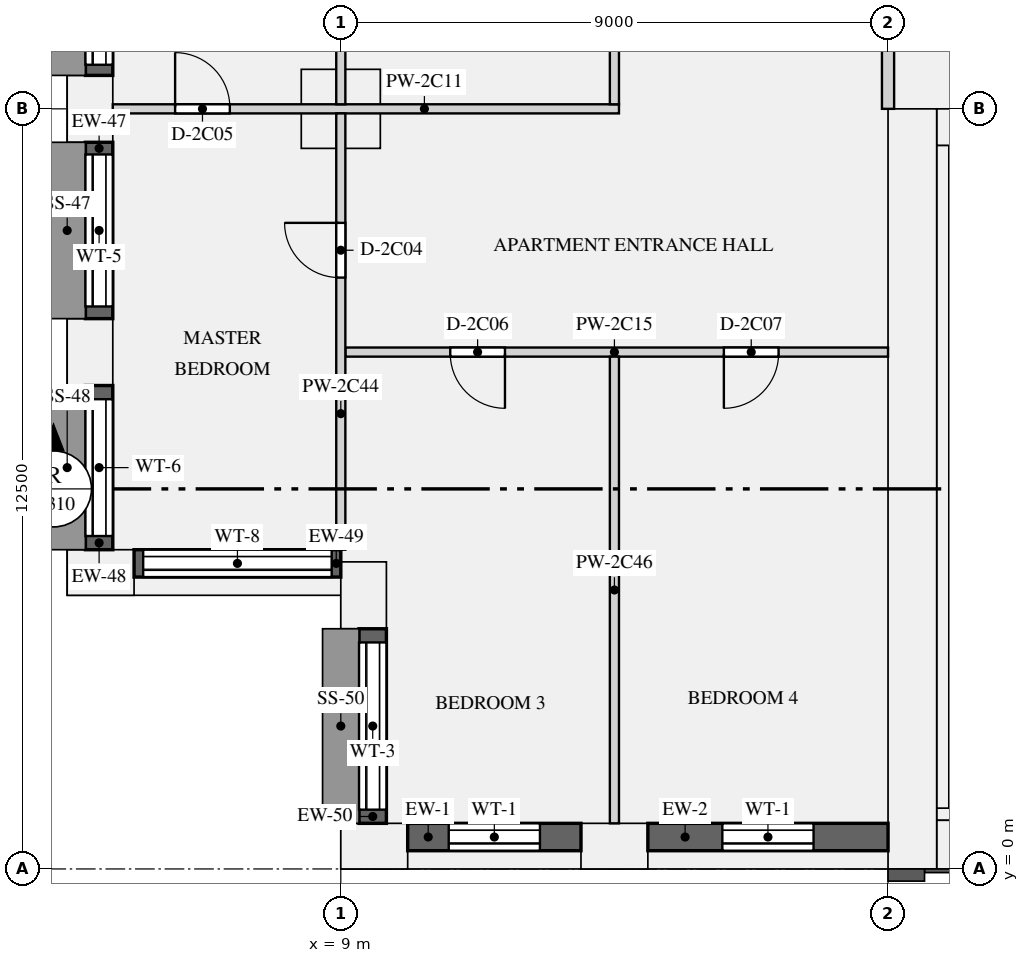
"""IFC4 building model, lengths in metres.
Left out: names, types, materials, properties, quantities, classifications, styles, units other than length and angle.
Written with IfcOpenShell. Run it as: python <this file> out.ifc"""

import sys

from ifc_helpers import new_model, si_unit, direction, frame, frame_2d, origin, origin_2d, place, context, subcontext, project, spatial, rectangle, extrude, element, fill, save


model = new_model("IFC4")
c1 = context("Model", 3, precision=1e-05, world=origin(), true_north=direction((0.0, 1.0)))
c2 = subcontext(c1, "Body", "Model", "MODEL_VIEW")
j1 = project(units=[si_unit("LENGTHUNIT", "METRE"), si_unit("PLANEANGLEUNIT", "RADIAN")], contexts=[c1])
p1 = place(None, origin())
s1 = spatial("IfcSite", under=j1, at=p1, CompositionType="ELEMENT")
p2 = place(p1, origin())
s2 = spatial("IfcBuilding", under=s1, at=p2, CompositionType="ELEMENT")
p3 = place(p2, frame((0.0, 0.0, 102.45)))
s3 = spatial("IfcBuildingStorey", under=s2, at=p3, CompositionType="ELEMENT", Elevation=102.45)
for number, where, z_axis, x_axis in (
    (1, (9.55, 0.375, 0.0), (0.0, 0.0, 1.0), (1.0, 0.0, 0.0)),
    (2, (13.5, 0.375, 0.0), (0.0, 0.0, 1.0), (1.0, 0.0, 0.0)),
    (3, (4.875, 12.5, 0.0), (0.0, 0.0, 1.0), (0.0, -1.0, 0.0)),
    (4, (4.875, 8.5, 0.0), (0.0, 0.0, 1.0), (0.0, -1.0, 0.0)),
    (5, (5.05, 4.875, 0.0), (0.0, 0.0, 1.0), (1.0, 0.0, 0.0)),
    (6, (9.375, 4.5, 0.0), (0.0, 0.0, 1.0), (0.0, -1.0, 0.0)),
):
    element("IfcColumn", number, at=place(p3, frame(where, z_axis=z_axis, x_axis=x_axis)), inside=s3, PredefinedType="USERDEFINED", context=c2, shape_type="SweptSolid", body=[
        extrude(rectangle(XDim=1.1, YDim=0.75, at=origin_2d()), origin(), (0.0, 0.0, 1.0), 3.15),
    ])
p4 = place(p3, frame((9.0, 12.5, 0.0), z_axis=(0.0, 0.0, 1.0), x_axis=(1.0, 0.0, 0.0)))
e7 = element("IfcColumn", 7, at=p4, inside=s3, PredefinedType="COLUMN", context=c2, shape_type="SweptSolid", body=[
    extrude(rectangle(XDim=1.3, YDim=1.3, at=origin_2d()), origin(), (0.0, 0.0, 1.0), 3.15),
])
p5 = place(p3, frame((18.4, 0.0, 0.0), z_axis=(0.0, 0.0, 1.0), x_axis=(0.0, 1.0, 0.0)))
e8 = element("IfcWall", 8, at=p5, inside=s3, PredefinedType="SHEAR", context=c2, shape_type="SweptSolid", body=[
    extrude(rectangle(XDim=12.5, YDim=0.8, at=frame_2d((6.25, 0.0))), origin(), (0.0, 0.0, 1.0), 3.15),
])
p6 = place(p3, frame((18.8, 0.4, 0.0), z_axis=(0.0, 0.0, 1.0), x_axis=(1.0, 0.0, 0.0)))
e9 = element("IfcWall", 9, at=p6, inside=s3, PredefinedType="SHEAR", context=c2, shape_type="SweptSolid", body=[
    extrude(rectangle(XDim=34.4, YDim=0.8, at=frame_2d((17.2, 0.0))), origin(), (0.0, 0.0, 1.0), 3.15),
])
p7 = place(p3, frame((18.8, 12.2, 0.0), z_axis=(0.0, 0.0, 1.0), x_axis=(1.0, 0.0, 0.0)))
e10 = element("IfcWall", 10, at=p7, inside=s3, PredefinedType="SHEAR", context=c2, shape_type="SweptSolid", body=[
    extrude(rectangle(XDim=34.4, YDim=0.6, at=frame_2d((17.2, 0.0))), origin(), (0.0, 0.0, 1.0), 3.15),
])
p8 = place(p7, frame((24.375, 0.0, 0.0)))
e11 = element("IfcOpeningElement", 11, at=p8, cuts=e10, PredefinedType="OPENING", context=c2, shape_type="SweptSolid", body=[
    extrude(rectangle(XDim=1.1, YDim=2.1, at=frame_2d((0.55, 1.05))), frame((0.0, 0.31, 0.0), z_axis=(0.0, -1.0, 0.0), x_axis=(1.0, 0.0, 0.0)), (0.0, 0.0, 1.0), 0.62),
])
p9 = place(p7, frame((26.625, 0.0, 0.0)))
e12 = element("IfcOpeningElement", 12, at=p9, cuts=e10, PredefinedType="OPENING", context=c2, shape_type="SweptSolid", body=[
    extrude(rectangle(XDim=1.1, YDim=2.1, at=frame_2d((0.55, 1.05))), frame((0.0, 0.31, 0.0), z_axis=(0.0, -1.0, 0.0), x_axis=(1.0, 0.0, 0.0)), (0.0, 0.0, 1.0), 0.62),
])
p10 = place(p7, frame((28.875, 0.0, 0.0)))
e13 = element("IfcOpeningElement", 13, at=p10, cuts=e10, PredefinedType="OPENING", context=c2, shape_type="SweptSolid", body=[
    extrude(rectangle(XDim=1.1, YDim=2.1, at=frame_2d((0.55, 1.05))), frame((0.0, 0.31, 0.0), z_axis=(0.0, -1.0, 0.0), x_axis=(1.0, 0.0, 0.0)), (0.0, 0.0, 1.0), 0.62),
])
p11 = place(p7, frame((4.75, 0.0, 0.0)))
e14 = element("IfcOpeningElement", 14, at=p11, cuts=e10, PredefinedType="OPENING", context=c2, shape_type="SweptSolid", body=[
    extrude(rectangle(XDim=0.9, YDim=2.1, at=frame_2d((0.45, 1.05))), frame((0.0, 0.31, 0.0), z_axis=(0.0, -1.0, 0.0), x_axis=(1.0, 0.0, 0.0)), (0.0, 0.0, 1.0), 0.62),
])
p12 = place(p7, frame((13.75, 0.0, 0.0)))
e15 = element("IfcOpeningElement", 15, at=p12, cuts=e10, PredefinedType="OPENING", context=c2, shape_type="SweptSolid", body=[
    extrude(rectangle(XDim=0.9, YDim=2.1, at=frame_2d((0.45, 1.05))), frame((0.0, 0.31, 0.0), z_axis=(0.0, -1.0, 0.0), x_axis=(1.0, 0.0, 0.0)), (0.0, 0.0, 1.0), 0.62),
])
p13 = place(p7, frame((18.25, 0.0, 0.0)))
e16 = element("IfcOpeningElement", 16, at=p13, cuts=e10, PredefinedType="OPENING", context=c2, shape_type="SweptSolid", body=[
    extrude(rectangle(XDim=0.9, YDim=2.1, at=frame_2d((0.45, 1.05))), frame((0.0, 0.31, 0.0), z_axis=(0.0, -1.0, 0.0), x_axis=(1.0, 0.0, 0.0)), (0.0, 0.0, 1.0), 0.62),
])
p14 = place(p7, frame((1.35, 0.0, 0.0)))
e17 = element("IfcOpeningElement", 17, at=p14, cuts=e10, PredefinedType="OPENING", context=c2, shape_type="SweptSolid", body=[
    extrude(rectangle(XDim=1.2, YDim=2.1, at=frame_2d((0.6, 1.05))), frame((0.0, 0.31, 0.0), z_axis=(0.0, -1.0, 0.0), x_axis=(1.0, 0.0, 0.0)), (0.0, 0.0, 1.0), 0.62),
])
p15 = place(p7, frame((31.85, 0.0, 0.0)))
e18 = element("IfcOpeningElement", 18, at=p15, cuts=e10, PredefinedType="OPENING", context=c2, shape_type="SweptSolid", body=[
    extrude(rectangle(XDim=1.2, YDim=2.1, at=frame_2d((0.6, 1.05))), frame((0.0, 0.31, 0.0), z_axis=(0.0, -1.0, 0.0), x_axis=(1.0, 0.0, 0.0)), (0.0, 0.0, 1.0), 0.62),
])
p16 = place(p3, frame((18.9, 1.0, 0.0), z_axis=(0.0, 0.0, 1.0), x_axis=(0.0, 1.0, 0.0)))
e19 = element("IfcWall", 19, at=p16, inside=s3, PredefinedType="SHEAR", context=c2, shape_type="SweptSolid", body=[
    extrude(rectangle(XDim=10.9, YDim=0.2, at=frame_2d((5.45, 0.0))), origin(), (0.0, 0.0, 1.0), 3.15),
])
p17 = place(p3, frame((18.8, 0.9, 0.0), z_axis=(0.0, 0.0, 1.0), x_axis=(1.0, 0.0, 0.0)))
e20 = element("IfcWall", 20, at=p17, inside=s3, PredefinedType="SHEAR", context=c2, shape_type="SweptSolid", body=[
    extrude(rectangle(XDim=34.4, YDim=0.2, at=frame_2d((17.2, 0.0))), origin(), (0.0, 0.0, 1.0), 3.15),
])
p18 = place(p3, frame((19.0, 3.4, 0.0), z_axis=(0.0, 0.0, 1.0), x_axis=(1.0, 0.0, 0.0)))
e21 = element("IfcWall", 21, at=p18, inside=s3, PredefinedType="SHEAR", context=c2, shape_type="SweptSolid", body=[
    extrude(rectangle(XDim=2.55, YDim=0.3, at=frame_2d((1.275, 0.0))), origin(), (0.0, 0.0, 1.0), 3.15),
])
p19 = place(p18, frame((0.675, 0.0, 0.0)))
e22 = element("IfcOpeningElement", 22, at=p19, cuts=e21, PredefinedType="OPENING", context=c2, shape_type="SweptSolid", body=[
    extrude(rectangle(XDim=1.2, YDim=2.1, at=frame_2d((0.6, 1.05))), frame((0.0, 0.16, 0.0), z_axis=(0.0, -1.0, 0.0), x_axis=(1.0, 0.0, 0.0)), (0.0, 0.0, 1.0), 0.32),
])
p20 = place(p3, frame((10.1, 0.525, 0.9), z_axis=(0.0, 0.0, 1.0), x_axis=(1.0, 0.0, 0.0)))
e23 = element("IfcWall", 23, at=p20, inside=s3, PredefinedType="SOLIDWALL", context=c2, shape_type="SweptSolid", body=[
    extrude(rectangle(XDim=2.85, YDim=0.45, at=frame_2d((1.425, 0.0))), origin(), (0.0, 0.0, 1.0), 1.93),
])
p21 = place(p20, frame((0.675, 0.0, 0.15)))
e24 = element("IfcOpeningElement", 24, at=p21, cuts=e23, PredefinedType="OPENING", context=c2, shape_type="SweptSolid", body=[
    extrude(rectangle(XDim=1.5, YDim=1.5, at=frame_2d((0.75, 0.75))), frame((0.0, 0.235, 0.0), z_axis=(0.0, -1.0, 0.0), x_axis=(1.0, 0.0, 0.0)), (0.0, 0.0, 1.0), 0.47),
])
p22 = place(p3, frame((14.05, 0.525, 0.9), z_axis=(0.0, 0.0, 1.0), x_axis=(1.0, 0.0, 0.0)))
e25 = element("IfcWall", 25, at=p22, inside=s3, PredefinedType="SOLIDWALL", context=c2, shape_type="SweptSolid", body=[
    extrude(rectangle(XDim=3.95, YDim=0.45, at=frame_2d((1.975, 0.0))), origin(), (0.0, 0.0, 1.0), 1.93),
])
p23 = place(p22, frame((1.225, 0.0, 0.15)))
e26 = element("IfcOpeningElement", 26, at=p23, cuts=e25, PredefinedType="OPENING", context=c2, shape_type="SweptSolid", body=[
    extrude(rectangle(XDim=1.5, YDim=1.5, at=frame_2d((0.75, 0.75))), frame((0.0, 0.235, 0.0), z_axis=(0.0, -1.0, 0.0), x_axis=(1.0, 0.0, 0.0)), (0.0, 0.0, 1.0), 0.47),
])
p24 = place(p3, frame((5.025, 15.4, 0.9), z_axis=(0.0, 0.0, 1.0), x_axis=(0.0, -1.0, 0.0)))
e27 = element("IfcWall", 27, at=p24, inside=s3, PredefinedType="SOLIDWALL", context=c2, shape_type="SweptSolid", body=[
    extrude(rectangle(XDim=2.35, YDim=0.45, at=frame_2d((1.175, 0.0))), origin(), (0.0, 0.0, 1.0), 1.93),
])
p25 = place(p24, frame((0.175, 0.0, 0.15)))
e28 = element("IfcOpeningElement", 28, at=p25, cuts=e27, PredefinedType="OPENING", context=c2, shape_type="SweptSolid", body=[
    extrude(rectangle(XDim=2.0, YDim=1.5, at=frame_2d((1.0, 0.75))), frame((0.0, 0.235, 0.0), z_axis=(0.0, -1.0, 0.0), x_axis=(1.0, 0.0, 0.0)), (0.0, 0.0, 1.0), 0.47),
])
p26 = place(p3, frame((5.025, 11.95, 0.9), z_axis=(0.0, 0.0, 1.0), x_axis=(0.0, -1.0, 0.0)))
e29 = element("IfcWall", 29, at=p26, inside=s3, PredefinedType="SOLIDWALL", context=c2, shape_type="SweptSolid", body=[
    extrude(rectangle(XDim=2.9, YDim=0.45, at=frame_2d((1.45, 0.0))), origin(), (0.0, 0.0, 1.0), 1.93),
])
p27 = place(p26, frame((0.2, 0.0, 0.15)))
e30 = element("IfcOpeningElement", 30, at=p27, cuts=e29, PredefinedType="OPENING", context=c2, shape_type="SweptSolid", body=[
    extrude(rectangle(XDim=2.5, YDim=1.5, at=frame_2d((1.25, 0.75))), frame((0.0, 0.235, 0.0), z_axis=(0.0, -1.0, 0.0), x_axis=(1.0, 0.0, 0.0)), (0.0, 0.0, 1.0), 0.47),
])
p28 = place(p3, frame((5.025, 7.95, 0.9), z_axis=(0.0, 0.0, 1.0), x_axis=(0.0, -1.0, 0.0)))
e31 = element("IfcWall", 31, at=p28, inside=s3, PredefinedType="SOLIDWALL", context=c2, shape_type="SweptSolid", body=[
    extrude(rectangle(XDim=2.7, YDim=0.45, at=frame_2d((1.35, 0.0))), origin(), (0.0, 0.0, 1.0), 1.93),
])
p29 = place(p28, frame((0.225, 0.0, 0.15)))
e32 = element("IfcOpeningElement", 32, at=p29, cuts=e31, PredefinedType="OPENING", context=c2, shape_type="SweptSolid", body=[
    extrude(rectangle(XDim=2.25, YDim=1.5, at=frame_2d((1.125, 0.75))), frame((0.0, 0.235, 0.0), z_axis=(0.0, -1.0, 0.0), x_axis=(1.0, 0.0, 0.0)), (0.0, 0.0, 1.0), 0.47),
])
p30 = place(p3, frame((5.6, 5.025, 0.9), z_axis=(0.0, 0.0, 1.0), x_axis=(1.0, 0.0, 0.0)))
e33 = element("IfcWall", 33, at=p30, inside=s3, PredefinedType="SOLIDWALL", context=c2, shape_type="SweptSolid", body=[
    extrude(rectangle(XDim=3.4, YDim=0.45, at=frame_2d((1.7, 0.0))), origin(), (0.0, 0.0, 1.0), 1.93),
])
p31 = place(p30, frame((0.15, 0.0, 0.15)))
e34 = element("IfcOpeningElement", 34, at=p31, cuts=e33, PredefinedType="OPENING", context=c2, shape_type="SweptSolid", body=[
    extrude(rectangle(XDim=3.1, YDim=1.5, at=frame_2d((1.55, 0.75))), frame((0.0, 0.235, 0.0), z_axis=(0.0, -1.0, 0.0), x_axis=(1.0, 0.0, 0.0)), (0.0, 0.0, 1.0), 0.47),
])
p32 = place(p3, frame((9.525, 3.95, 0.9), z_axis=(0.0, 0.0, 1.0), x_axis=(0.0, -1.0, 0.0)))
e35 = element("IfcWall", 35, at=p32, inside=s3, PredefinedType="SOLIDWALL", context=c2, shape_type="SweptSolid", body=[
    extrude(rectangle(XDim=3.2, YDim=0.45, at=frame_2d((1.6, 0.0))), origin(), (0.0, 0.0, 1.0), 1.93),
])
p33 = place(p32, frame((0.225, 0.0, 0.15)))
e36 = element("IfcOpeningElement", 36, at=p33, cuts=e35, PredefinedType="OPENING", context=c2, shape_type="SweptSolid", body=[
    extrude(rectangle(XDim=2.75, YDim=1.5, at=frame_2d((1.375, 0.75))), frame((0.0, 0.235, 0.0), z_axis=(0.0, -1.0, 0.0), x_axis=(1.0, 0.0, 0.0)), (0.0, 0.0, 1.0), 0.47),
])
p34 = place(p3, frame((18.0, 12.5, 0.0), z_axis=(0.0, 0.0, 1.0), x_axis=(0.0, 1.0, 0.0)))
e37 = element("IfcWall", 37, at=p34, inside=s3, PredefinedType="PARTITIONING", context=c2, shape_type="SweptSolid", body=[
    extrude(rectangle(XDim=3.4, YDim=0.2, at=frame_2d((1.7, 0.0))), origin(), (0.0, 0.0, 1.0), 2.83),
])
p35 = place(p3, frame((5.25, 12.5, 0.0), z_axis=(0.0, 0.0, 1.0), x_axis=(1.0, 0.0, 0.0)))
e38 = element("IfcWall", 38, at=p35, inside=s3, PredefinedType="PARTITIONING", context=c2, shape_type="SweptSolid", body=[
    extrude(rectangle(XDim=8.325, YDim=0.15, at=frame_2d((4.163, 0.0))), origin(), (0.0, 0.0, 1.0), 2.83),
])
p36 = place(p35, frame((1.025, 0.0, 0.0)))
e39 = element("IfcOpeningElement", 39, at=p36, cuts=e38, PredefinedType="OPENING", context=c2, shape_type="SweptSolid", body=[
    extrude(rectangle(XDim=0.9, YDim=2.1, at=frame_2d((0.45, 1.05))), frame((0.0, 0.085, 0.0), z_axis=(0.0, -1.0, 0.0), x_axis=(1.0, 0.0, 0.0)), (0.0, 0.0, 1.0), 0.17),
])
p37 = place(p3, frame((9.075, 8.5, 0.0), z_axis=(0.0, 0.0, 1.0), x_axis=(1.0, 0.0, 0.0)))
e40 = element("IfcWall", 40, at=p37, inside=s3, PredefinedType="PARTITIONING", context=c2, shape_type="SweptSolid", body=[
    extrude(rectangle(XDim=8.925, YDim=0.15, at=frame_2d((4.462, 0.0))), origin(), (0.0, 0.0, 1.0), 2.83),
])
p38 = place(p37, frame((1.725, 0.0, 0.0)))
e41 = element("IfcOpeningElement", 41, at=p38, cuts=e40, PredefinedType="OPENING", context=c2, shape_type="SweptSolid", body=[
    extrude(rectangle(XDim=0.9, YDim=2.1, at=frame_2d((0.45, 1.05))), frame((0.0, 0.085, 0.0), z_axis=(0.0, -1.0, 0.0), x_axis=(1.0, 0.0, 0.0)), (0.0, 0.0, 1.0), 0.17),
])
p39 = place(p37, frame((6.225, 0.0, 0.0)))
e42 = element("IfcOpeningElement", 42, at=p39, cuts=e40, PredefinedType="OPENING", context=c2, shape_type="SweptSolid", body=[
    extrude(rectangle(XDim=0.9, YDim=2.1, at=frame_2d((0.45, 1.05))), frame((0.0, 0.085, 0.0), z_axis=(0.0, -1.0, 0.0), x_axis=(1.0, 0.0, 0.0)), (0.0, 0.0, 1.0), 0.17),
])
p40 = place(p3, frame((9.0, 5.25, 0.0), z_axis=(0.0, 0.0, 1.0), x_axis=(0.0, 1.0, 0.0)))
e43 = element("IfcWall", 43, at=p40, inside=s3, PredefinedType="PARTITIONING", context=c2, shape_type="SweptSolid", body=[
    extrude(rectangle(XDim=7.175, YDim=0.15, at=frame_2d((3.587, 0.0))), origin(), (0.0, 0.0, 1.0), 2.83),
])
p41 = place(p40, frame((4.475, 0.0, 0.0)))
e44 = element("IfcOpeningElement", 44, at=p41, cuts=e43, PredefinedType="OPENING", context=c2, shape_type="SweptSolid", body=[
    extrude(rectangle(XDim=0.9, YDim=2.1, at=frame_2d((0.45, 1.05))), frame((0.0, 0.085, 0.0), z_axis=(0.0, -1.0, 0.0), x_axis=(1.0, 0.0, 0.0)), (0.0, 0.0, 1.0), 0.17),
])
p42 = place(p3, frame((9.0, 12.575, 0.0), z_axis=(0.0, 0.0, 1.0), x_axis=(0.0, 1.0, 0.0)))
e45 = element("IfcWall", 45, at=p42, inside=s3, PredefinedType="PARTITIONING", context=c2, shape_type="SweptSolid", body=[
    extrude(rectangle(XDim=3.85, YDim=0.15, at=frame_2d((1.925, 0.0))), origin(), (0.0, 0.0, 1.0), 2.83),
])
p43 = place(p3, frame((13.5, 0.75, 0.0), z_axis=(0.0, 0.0, 1.0), x_axis=(0.0, 1.0, 0.0)))
e46 = element("IfcWall", 46, at=p43, inside=s3, PredefinedType="PARTITIONING", context=c2, shape_type="SweptSolid", body=[
    extrude(rectangle(XDim=7.675, YDim=0.15, at=frame_2d((3.837, 0.0))), origin(), (0.0, 0.0, 1.0), 2.83),
])
p44 = place(p3, frame((13.5, 12.575, 0.0), z_axis=(0.0, 0.0, 1.0), x_axis=(0.0, 1.0, 0.0)))
e47 = element("IfcWall", 47, at=p44, inside=s3, PredefinedType="PARTITIONING", context=c2, shape_type="SweptSolid", body=[
    extrude(rectangle(XDim=10.325, YDim=0.15, at=frame_2d((5.163, 0.0))), origin(), (0.0, 0.0, 1.0), 2.83),
])
p45 = place(p44, frame((1.475, 0.0, 0.0)))
e48 = element("IfcOpeningElement", 48, at=p45, cuts=e47, PredefinedType="OPENING", context=c2, shape_type="SweptSolid", body=[
    extrude(rectangle(XDim=0.9, YDim=2.1, at=frame_2d((0.45, 1.05))), frame((0.0, 0.085, 0.0), z_axis=(0.0, -1.0, 0.0), x_axis=(1.0, 0.0, 0.0)), (0.0, 0.0, 1.0), 0.17),
])
p46 = place(p44, frame((6.45, 0.0, 0.0)))
e49 = element("IfcOpeningElement", 49, at=p46, cuts=e47, PredefinedType="OPENING", context=c2, shape_type="SweptSolid", body=[
    extrude(rectangle(XDim=1.5, YDim=2.1, at=frame_2d((0.75, 1.05))), frame((0.0, 0.085, 0.0), z_axis=(0.0, -1.0, 0.0), x_axis=(1.0, 0.0, 0.0)), (0.0, 0.0, 1.0), 0.17),
])
p47 = place(p21, origin())
e50 = element("IfcWindow", 50, at=p47, inside=s3, PartitioningType="SINGLE_PANEL", PredefinedType="WINDOW", context=c2, shape_type="SweptSolid", body=[
    extrude(rectangle(XDim=1.5, YDim=1.5, at=frame_2d((0.75, 0.75))), frame((0.0, -0.065, 0.0), z_axis=(0.0, -1.0, 0.0), x_axis=(1.0, 0.0, 0.0)), (0.0, 0.0, 1.0), 0.06),
])
fill(e24, e50)
p48 = place(p23, origin())
e51 = element("IfcWindow", 51, at=p48, inside=s3, PartitioningType="SINGLE_PANEL", PredefinedType="WINDOW", context=c2, shape_type="SweptSolid", body=[
    extrude(rectangle(XDim=1.5, YDim=1.5, at=frame_2d((0.75, 0.75))), frame((0.0, -0.065, 0.0), z_axis=(0.0, -1.0, 0.0), x_axis=(1.0, 0.0, 0.0)), (0.0, 0.0, 1.0), 0.06),
])
fill(e26, e51)
p49 = place(p25, origin())
e52 = element("IfcWindow", 52, at=p49, inside=s3, PartitioningType="SINGLE_PANEL", PredefinedType="WINDOW", context=c2, shape_type="SweptSolid", body=[
    extrude(rectangle(XDim=2.0, YDim=1.5, at=frame_2d((1.0, 0.75))), frame((0.0, -0.065, 0.0), z_axis=(0.0, -1.0, 0.0), x_axis=(1.0, 0.0, 0.0)), (0.0, 0.0, 1.0), 0.06),
])
fill(e28, e52)
p50 = place(p27, origin())
e53 = element("IfcWindow", 53, at=p50, inside=s3, PartitioningType="SINGLE_PANEL", PredefinedType="WINDOW", context=c2, shape_type="SweptSolid", body=[
    extrude(rectangle(XDim=2.5, YDim=1.5, at=frame_2d((1.25, 0.75))), frame((0.0, -0.065, 0.0), z_axis=(0.0, -1.0, 0.0), x_axis=(1.0, 0.0, 0.0)), (0.0, 0.0, 1.0), 0.06),
])
fill(e30, e53)
p51 = place(p29, origin())
e54 = element("IfcWindow", 54, at=p51, inside=s3, PartitioningType="SINGLE_PANEL", PredefinedType="WINDOW", context=c2, shape_type="SweptSolid", body=[
    extrude(rectangle(XDim=2.25, YDim=1.5, at=frame_2d((1.125, 0.75))), frame((0.0, -0.065, 0.0), z_axis=(0.0, -1.0, 0.0), x_axis=(1.0, 0.0, 0.0)), (0.0, 0.0, 1.0), 0.06),
])
fill(e32, e54)
p52 = place(p31, origin())
e55 = element("IfcWindow", 55, at=p52, inside=s3, PartitioningType="SINGLE_PANEL", PredefinedType="WINDOW", context=c2, shape_type="SweptSolid", body=[
    extrude(rectangle(XDim=3.1, YDim=1.5, at=frame_2d((1.55, 0.75))), frame((0.0, -0.065, 0.0), z_axis=(0.0, -1.0, 0.0), x_axis=(1.0, 0.0, 0.0)), (0.0, 0.0, 1.0), 0.06),
])
fill(e34, e55)
p53 = place(p33, origin())
e56 = element("IfcWindow", 56, at=p53, inside=s3, PartitioningType="SINGLE_PANEL", PredefinedType="WINDOW", context=c2, shape_type="SweptSolid", body=[
    extrude(rectangle(XDim=2.75, YDim=1.5, at=frame_2d((1.375, 0.75))), frame((0.0, -0.065, 0.0), z_axis=(0.0, -1.0, 0.0), x_axis=(1.0, 0.0, 0.0)), (0.0, 0.0, 1.0), 0.06),
])
fill(e36, e56)
p54 = place(p41, origin())
e57 = element("IfcDoor", 57, at=p54, inside=s3, OperationType="SINGLE_SWING_RIGHT", PredefinedType="DOOR", context=c2, shape_type="SweptSolid", body=[
    extrude(rectangle(XDim=0.9, YDim=2.1, at=frame_2d((0.45, 1.05))), frame((0.0, 0.025, 0.0), z_axis=(0.0, -1.0, 0.0), x_axis=(1.0, 0.0, 0.0)), (0.0, 0.0, 1.0), 0.05),
])
fill(e44, e57)
p55 = place(p36, origin())
e58 = element("IfcDoor", 58, at=p55, inside=s3, OperationType="SINGLE_SWING_LEFT", PredefinedType="DOOR", context=c2, shape_type="SweptSolid", body=[
    extrude(rectangle(XDim=0.9, YDim=2.1, at=frame_2d((0.45, 1.05))), frame((0.0, 0.025, 0.0), z_axis=(0.0, -1.0, 0.0), x_axis=(1.0, 0.0, 0.0)), (0.0, 0.0, 1.0), 0.05),
])
fill(e39, e58)
p56 = place(p38, frame((0.9, 0.0, 0.0), z_axis=(0.0, 0.0, 1.0), x_axis=(-1.0, 0.0, 0.0)))
e59 = element("IfcDoor", 59, at=p56, inside=s3, OperationType="SINGLE_SWING_LEFT", PredefinedType="DOOR", context=c2, shape_type="SweptSolid", body=[
    extrude(rectangle(XDim=0.9, YDim=2.1, at=frame_2d((0.45, 1.05))), frame((0.0, 0.025, 0.0), z_axis=(0.0, -1.0, 0.0), x_axis=(1.0, 0.0, 0.0)), (0.0, 0.0, 1.0), 0.05),
])
fill(e41, e59)
p57 = place(p39, frame((0.9, 0.0, 0.0), z_axis=(0.0, 0.0, 1.0), x_axis=(-1.0, 0.0, 0.0)))
e60 = element("IfcDoor", 60, at=p57, inside=s3, OperationType="SINGLE_SWING_RIGHT", PredefinedType="DOOR", context=c2, shape_type="SweptSolid", body=[
    extrude(rectangle(XDim=0.9, YDim=2.1, at=frame_2d((0.45, 1.05))), frame((0.0, 0.025, 0.0), z_axis=(0.0, -1.0, 0.0), x_axis=(1.0, 0.0, 0.0)), (0.0, 0.0, 1.0), 0.05),
])
fill(e42, e60)
save(model, sys.argv[1])
